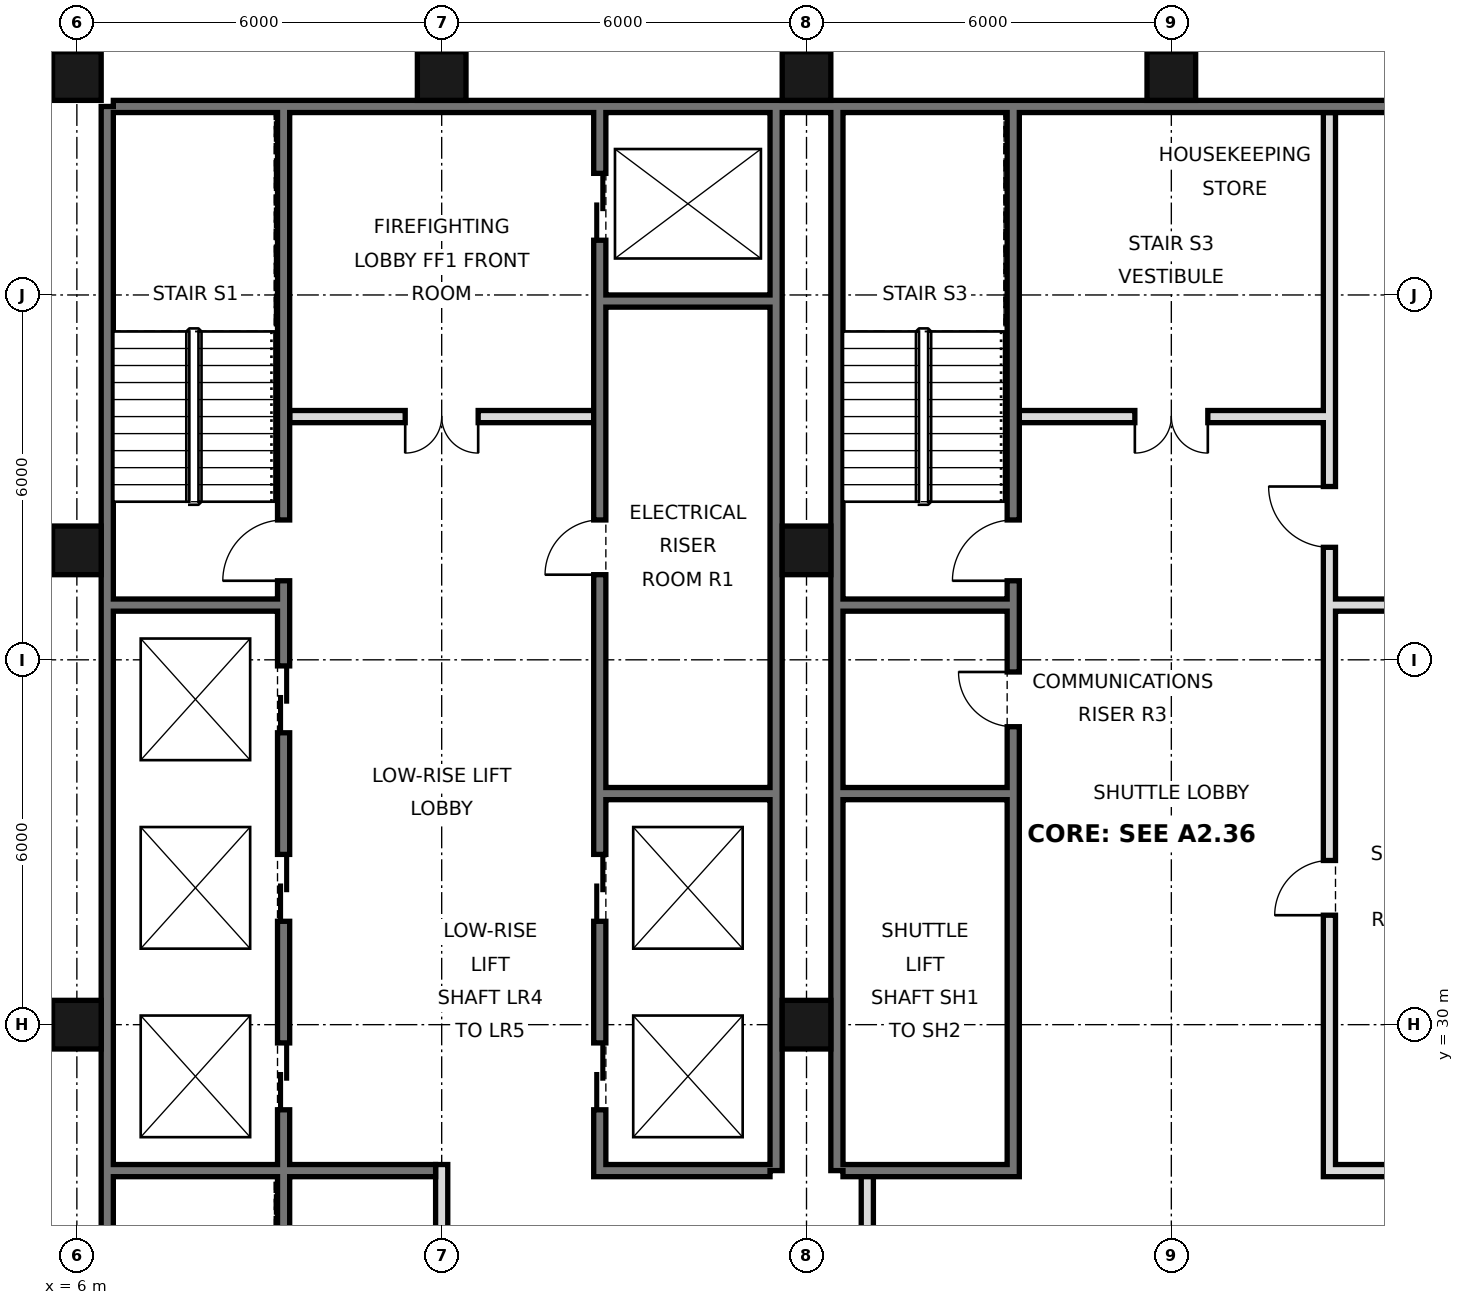
"""IFC4 building model, lengths in metres.
Left out: names, types, materials, properties, quantities, classifications, styles, units other than length and angle.
Written with IfcOpenShell. Run it as: python <this file> out.ifc"""

import sys

from ifc_helpers import new_model, si_unit, direction, frame, frame_2d, origin, origin_2d, place, context, subcontext, project, spatial, rectangle, hollow_rectangle, extrude, element, fill, save


model = new_model("IFC4")
c1 = context("Model", 3, precision=1e-05, world=origin(), true_north=direction((0.0, 1.0)))
c2 = subcontext(c1, "Body", "Model", "MODEL_VIEW")
j1 = project(units=[si_unit("LENGTHUNIT", "METRE"), si_unit("PLANEANGLEUNIT", "RADIAN")], contexts=[c1])
p1 = place(None, origin())
s1 = spatial("IfcSite", under=j1, at=p1, CompositionType="ELEMENT")
p2 = place(p1, origin())
s2 = spatial("IfcBuilding", under=s1, at=p2, CompositionType="ELEMENT")
p3 = place(p2, frame((0.0, 0.0, 143.8)))
s3 = spatial("IfcBuildingStorey", under=s2, at=p3, CompositionType="ELEMENT", Elevation=143.8)
for number, where, z_axis, x_axis in (
    (1, (6.0, 30.0, 0.0), (0.0, 0.0, 1.0), (1.0, 0.0, 0.0)),
    (2, (6.0, 37.8, 0.0), (0.0, 0.0, 1.0), (1.0, 0.0, 0.0)),
    (3, (6.0, 45.6, 0.0), (0.0, 0.0, 1.0), (1.0, 0.0, 0.0)),
    (4, (12.0, 45.6, 0.0), (0.0, 0.0, 1.0), (1.0, 0.0, 0.0)),
    (5, (18.0, 30.0, 0.0), (0.0, 0.0, 1.0), (1.0, 0.0, 0.0)),
    (6, (18.0, 37.8, 0.0), (0.0, 0.0, 1.0), (1.0, 0.0, 0.0)),
    (7, (18.0, 45.6, 0.0), (0.0, 0.0, 1.0), (1.0, 0.0, 0.0)),
    (8, (24.0, 45.6, 0.0), (0.0, 0.0, 1.0), (1.0, 0.0, 0.0)),
):
    element("IfcColumn", number, at=place(p3, frame(where, z_axis=z_axis, x_axis=x_axis)), inside=s3, PredefinedType="COLUMN", context=c2, shape_type="SweptSolid", body=[
        extrude(hollow_rectangle(XDim=0.8, YDim=0.8, WallThickness=0.05, at=origin_2d()), origin(), (0.0, 0.0, 1.0), 3.6),
    ])
p4 = place(p3, frame((6.5, 21.6, 0.0), z_axis=(0.0, 0.0, 1.0), x_axis=(0.0, 1.0, 0.0)))
e9 = element("IfcWall", 9, at=p4, inside=s3, PredefinedType="SOLIDWALL", context=c2, shape_type="SweptSolid", body=[
    extrude(rectangle(XDim=23.5, YDim=0.2, at=frame_2d((11.75, 0.0))), origin(), (0.0, 0.0, 1.0), 3.42),
])
p5 = place(p3, frame((6.6, 45.1, 0.0), z_axis=(0.0, 0.0, 1.0), x_axis=(1.0, 0.0, 0.0)))
e10 = element("IfcWall", 10, at=p5, inside=s3, PredefinedType="SOLIDWALL", context=c2, shape_type="SweptSolid", body=[
    extrude(rectangle(XDim=34.8, YDim=0.2, at=frame_2d((17.4, 0.0))), origin(), (0.0, 0.0, 1.0), 3.42),
])
for number, where, z_axis, x_axis in (
    (11, (17.5, 27.6, 0.0), (0.0, 0.0, 1.0), (0.0, 1.0, 0.0)),
    (12, (18.5, 27.6, 0.0), (0.0, 0.0, 1.0), (0.0, 1.0, 0.0)),
):
    element("IfcWall", number, at=place(p3, frame(where, z_axis=z_axis, x_axis=x_axis)), inside=s3, PredefinedType="SOLIDWALL", context=c2, shape_type="SweptSolid", body=[
        extrude(rectangle(XDim=17.5, YDim=0.2, at=frame_2d((8.75, 0.0))), origin(), (0.0, 0.0, 1.0), 3.42),
    ])
p6 = place(p3, frame((19.0, 21.6, 0.0), z_axis=(0.0, 0.0, 1.0), x_axis=(0.0, 1.0, 0.0)))
e13 = element("IfcWall", 13, at=p6, inside=s3, PredefinedType="PARTITIONING", context=c2, shape_type="SweptSolid", body=[
    extrude(rectangle(XDim=6.0, YDim=0.2, at=frame_2d((3.0, 0.0))), origin(), (0.0, 0.0, 1.0), 3.42),
])
p7 = place(p6, frame((2.1, 0.0, 0.0)))
e14 = element("IfcOpeningElement", 14, at=p7, cuts=e13, PredefinedType="OPENING", context=c2, shape_type="SweptSolid", body=[
    extrude(rectangle(XDim=1.8, YDim=2.1, at=frame_2d((0.9, 1.05))), frame((0.0, 0.11, 0.0), z_axis=(0.0, -1.0, 0.0), x_axis=(1.0, 0.0, 0.0)), (0.0, 0.0, 1.0), 0.22),
])
p8 = place(p3, frame((12.0, 21.6, 0.0), z_axis=(0.0, 0.0, 1.0), x_axis=(0.0, 1.0, 0.0)))
e15 = element("IfcWall", 15, at=p8, inside=s3, PredefinedType="PARTITIONING", context=c2, shape_type="SweptSolid", body=[
    extrude(rectangle(XDim=6.1, YDim=0.2, at=frame_2d((3.05, 0.0))), origin(), (0.0, 0.0, 1.0), 3.42),
])
p9 = place(p3, frame((14.6, 27.5, 0.0), z_axis=(0.0, 0.0, 1.0), x_axis=(0.0, 1.0, 0.0)))
e16 = element("IfcWall", 16, at=p9, inside=s3, PredefinedType="SOLIDWALL", context=c2, shape_type="SweptSolid", body=[
    extrude(rectangle(XDim=17.5, YDim=0.2, at=frame_2d((8.75, 0.0))), origin(), (0.0, 0.0, 1.0), 3.42),
])
p10 = place(p9, frame((1.1, 0.0, 0.0)))
e17 = element("IfcOpeningElement", 17, at=p10, cuts=e16, PredefinedType="OPENING", context=c2, shape_type="SweptSolid", body=[
    extrude(rectangle(XDim=1.1, YDim=2.1, at=frame_2d((0.55, 1.05))), frame((0.0, 0.11, 0.0), z_axis=(0.0, -1.0, 0.0), x_axis=(1.0, 0.0, 0.0)), (0.0, 0.0, 1.0), 0.22),
])
p11 = place(p9, frame((4.2, 0.0, 0.0)))
e18 = element("IfcOpeningElement", 18, at=p11, cuts=e16, PredefinedType="OPENING", context=c2, shape_type="SweptSolid", body=[
    extrude(rectangle(XDim=1.1, YDim=2.1, at=frame_2d((0.55, 1.05))), frame((0.0, 0.11, 0.0), z_axis=(0.0, -1.0, 0.0), x_axis=(1.0, 0.0, 0.0)), (0.0, 0.0, 1.0), 0.22),
])
p12 = place(p9, frame((15.4, 0.0, 0.0)))
e19 = element("IfcOpeningElement", 19, at=p12, cuts=e16, PredefinedType="OPENING", context=c2, shape_type="SweptSolid", body=[
    extrude(rectangle(XDim=1.1, YDim=2.1, at=frame_2d((0.55, 1.05))), frame((0.0, 0.11, 0.0), z_axis=(0.0, -1.0, 0.0), x_axis=(1.0, 0.0, 0.0)), (0.0, 0.0, 1.0), 0.22),
])
p13 = place(p9, frame((9.9, 0.0, 0.0)))
e20 = element("IfcOpeningElement", 20, at=p13, cuts=e16, PredefinedType="OPENING", context=c2, shape_type="SweptSolid", body=[
    extrude(rectangle(XDim=0.9, YDim=2.1, at=frame_2d((0.45, 1.05))), frame((0.0, 0.11, 0.0), z_axis=(0.0, -1.0, 0.0), x_axis=(1.0, 0.0, 0.0)), (0.0, 0.0, 1.0), 0.22),
])
p14 = place(p3, frame((21.4, 27.5, 0.0), z_axis=(0.0, 0.0, 1.0), x_axis=(0.0, 1.0, 0.0)))
e21 = element("IfcWall", 21, at=p14, inside=s3, PredefinedType="SOLIDWALL", context=c2, shape_type="SweptSolid", body=[
    extrude(rectangle(XDim=17.5, YDim=0.2, at=frame_2d((8.75, 0.0))), origin(), (0.0, 0.0, 1.0), 3.42),
])
p15 = place(p14, frame((9.8, 0.0, 0.0)))
e22 = element("IfcOpeningElement", 22, at=p15, cuts=e21, PredefinedType="OPENING", context=c2, shape_type="SweptSolid", body=[
    extrude(rectangle(XDim=1.0, YDim=2.1, at=frame_2d((0.5, 1.05))), frame((0.0, 0.11, 0.0), z_axis=(0.0, -1.0, 0.0), x_axis=(1.0, 0.0, 0.0)), (0.0, 0.0, 1.0), 0.22),
])
p16 = place(p14, frame((7.4, 0.0, 0.0)))
e23 = element("IfcOpeningElement", 23, at=p16, cuts=e21, PredefinedType="OPENING", context=c2, shape_type="SweptSolid", body=[
    extrude(rectangle(XDim=0.9, YDim=2.1, at=frame_2d((0.45, 1.05))), frame((0.0, 0.11, 0.0), z_axis=(0.0, -1.0, 0.0), x_axis=(1.0, 0.0, 0.0)), (0.0, 0.0, 1.0), 0.22),
])
p17 = place(p3, frame((26.6, 27.5, 0.0), z_axis=(0.0, 0.0, 1.0), x_axis=(0.0, 1.0, 0.0)))
e24 = element("IfcWall", 24, at=p17, inside=s3, PredefinedType="SOLIDWALL", context=c2, shape_type="SweptSolid", body=[
    extrude(rectangle(XDim=17.5, YDim=0.2, at=frame_2d((8.75, 0.0))), origin(), (0.0, 0.0, 1.0), 3.42),
])
p18 = place(p17, frame((4.3, 0.0, 0.0)))
e25 = element("IfcOpeningElement", 25, at=p18, cuts=e24, PredefinedType="OPENING", context=c2, shape_type="SweptSolid", body=[
    extrude(rectangle(XDim=0.9, YDim=2.1, at=frame_2d((0.45, 1.05))), frame((0.0, 0.11, 0.0), z_axis=(0.0, -1.0, 0.0), x_axis=(1.0, 0.0, 0.0)), (0.0, 0.0, 1.0), 0.22),
])
p19 = place(p17, frame((10.35, 0.0, 0.0)))
e26 = element("IfcOpeningElement", 26, at=p19, cuts=e24, PredefinedType="OPENING", context=c2, shape_type="SweptSolid", body=[
    extrude(rectangle(XDim=1.0, YDim=2.1, at=frame_2d((0.5, 1.05))), frame((0.0, 0.11, 0.0), z_axis=(0.0, -1.0, 0.0), x_axis=(1.0, 0.0, 0.0)), (0.0, 0.0, 1.0), 0.22),
])
p20 = place(p3, frame((9.4, 21.6, 0.0), z_axis=(0.0, 0.0, 1.0), x_axis=(0.0, 1.0, 0.0)))
e27 = element("IfcWall", 27, at=p20, inside=s3, PredefinedType="SOLIDWALL", context=c2, shape_type="SweptSolid", body=[
    extrude(rectangle(XDim=23.4, YDim=0.2, at=frame_2d((11.7, 0.0))), origin(), (0.0, 0.0, 1.0), 3.42),
])
p21 = place(p20, frame((7.0, 0.0, 0.0)))
e28 = element("IfcOpeningElement", 28, at=p21, cuts=e27, PredefinedType="OPENING", context=c2, shape_type="SweptSolid", body=[
    extrude(rectangle(XDim=1.1, YDim=2.1, at=frame_2d((0.55, 1.05))), frame((0.0, 0.11, 0.0), z_axis=(0.0, -1.0, 0.0), x_axis=(1.0, 0.0, 0.0)), (0.0, 0.0, 1.0), 0.22),
])
p22 = place(p20, frame((10.1, 0.0, 0.0)))
e29 = element("IfcOpeningElement", 29, at=p22, cuts=e27, PredefinedType="OPENING", context=c2, shape_type="SweptSolid", body=[
    extrude(rectangle(XDim=1.1, YDim=2.1, at=frame_2d((0.55, 1.05))), frame((0.0, 0.11, 0.0), z_axis=(0.0, -1.0, 0.0), x_axis=(1.0, 0.0, 0.0)), (0.0, 0.0, 1.0), 0.22),
])
p23 = place(p20, frame((13.2, 0.0, 0.0)))
e30 = element("IfcOpeningElement", 30, at=p23, cuts=e27, PredefinedType="OPENING", context=c2, shape_type="SweptSolid", body=[
    extrude(rectangle(XDim=1.1, YDim=2.1, at=frame_2d((0.55, 1.05))), frame((0.0, 0.11, 0.0), z_axis=(0.0, -1.0, 0.0), x_axis=(1.0, 0.0, 0.0)), (0.0, 0.0, 1.0), 0.22),
])
p24 = place(p20, frame((15.7, 0.0, 0.0)))
e31 = element("IfcOpeningElement", 31, at=p24, cuts=e27, PredefinedType="OPENING", context=c2, shape_type="SweptSolid", body=[
    extrude(rectangle(XDim=1.0, YDim=2.1, at=frame_2d((0.5, 1.05))), frame((0.0, 0.11, 0.0), z_axis=(0.0, -1.0, 0.0), x_axis=(1.0, 0.0, 0.0)), (0.0, 0.0, 1.0), 0.22),
])
p25 = place(p20, frame((0.175, 0.0, 0.0)))
e32 = element("IfcOpeningElement", 32, at=p25, cuts=e27, PredefinedType="OPENING", context=c2, shape_type="SweptSolid", body=[
    extrude(rectangle(XDim=0.9, YDim=2.1, at=frame_2d((0.45, 1.05))), frame((0.0, 0.11, 0.0), z_axis=(0.0, -1.0, 0.0), x_axis=(1.0, 0.0, 0.0)), (0.0, 0.0, 1.0), 0.22),
])
for number, where, z_axis, x_axis in (
    (33, (14.7, 27.6, 0.0), (0.0, 0.0, 1.0), (1.0, 0.0, 0.0)),
    (34, (18.6, 27.6, 0.0), (0.0, 0.0, 1.0), (1.0, 0.0, 0.0)),
    (35, (26.7, 27.6, 0.0), (0.0, 0.0, 1.0), (1.0, 0.0, 0.0)),
):
    element("IfcWall", number, at=place(p3, frame(where, z_axis=z_axis, x_axis=x_axis)), inside=s3, PredefinedType="SOLIDWALL", context=c2, shape_type="SweptSolid", body=[
        extrude(rectangle(XDim=2.7, YDim=0.2, at=frame_2d((1.35, 0.0))), origin(), (0.0, 0.0, 1.0), 3.42),
    ])
p26 = place(p3, frame((6.6, 27.6, 0.0), z_axis=(0.0, 0.0, 1.0), x_axis=(1.0, 0.0, 0.0)))
e36 = element("IfcWall", 36, at=p26, inside=s3, PredefinedType="SOLIDWALL", context=c2, shape_type="SweptSolid", body=[
    extrude(rectangle(XDim=5.3, YDim=0.2, at=frame_2d((2.65, 0.0))), origin(), (0.0, 0.0, 1.0), 3.42),
])
for number, where, z_axis, x_axis in (
    (37, (14.7, 33.8, 0.0), (0.0, 0.0, 1.0), (1.0, 0.0, 0.0)),
    (38, (18.6, 33.8, 0.0), (0.0, 0.0, 1.0), (1.0, 0.0, 0.0)),
    (39, (18.6, 36.9, 0.0), (0.0, 0.0, 1.0), (1.0, 0.0, 0.0)),
    (40, (26.7, 36.9, 0.0), (0.0, 0.0, 1.0), (1.0, 0.0, 0.0)),
    (41, (6.6, 36.9, 0.0), (0.0, 0.0, 1.0), (1.0, 0.0, 0.0)),
):
    element("IfcWall", number, at=place(p3, frame(where, z_axis=z_axis, x_axis=x_axis)), inside=s3, PredefinedType="SOLIDWALL", context=c2, shape_type="SweptSolid", body=[
        extrude(rectangle(XDim=2.7, YDim=0.2, at=frame_2d((1.35, 0.0))), origin(), (0.0, 0.0, 1.0), 3.42),
    ])
p27 = place(p3, frame((21.5, 40.0, 0.0), z_axis=(0.0, 0.0, 1.0), x_axis=(1.0, 0.0, 0.0)))
e42 = element("IfcWall", 42, at=p27, inside=s3, PredefinedType="PARTITIONING", context=c2, shape_type="SweptSolid", body=[
    extrude(rectangle(XDim=5.0, YDim=0.2, at=frame_2d((2.5, 0.0))), origin(), (0.0, 0.0, 1.0), 3.42),
])
p28 = place(p27, frame((1.9, 0.0, 0.0)))
e43 = element("IfcOpeningElement", 43, at=p28, cuts=e42, PredefinedType="OPENING", context=c2, shape_type="SweptSolid", body=[
    extrude(rectangle(XDim=1.2, YDim=2.1, at=frame_2d((0.6, 1.05))), frame((0.0, 0.11, 0.0), z_axis=(0.0, -1.0, 0.0), x_axis=(1.0, 0.0, 0.0)), (0.0, 0.0, 1.0), 0.22),
])
p29 = place(p3, frame((9.5, 40.0, 0.0), z_axis=(0.0, 0.0, 1.0), x_axis=(1.0, 0.0, 0.0)))
e44 = element("IfcWall", 44, at=p29, inside=s3, PredefinedType="PARTITIONING", context=c2, shape_type="SweptSolid", body=[
    extrude(rectangle(XDim=5.0, YDim=0.2, at=frame_2d((2.5, 0.0))), origin(), (0.0, 0.0, 1.0), 3.42),
])
p30 = place(p29, frame((1.9, 0.0, 0.0)))
e45 = element("IfcOpeningElement", 45, at=p30, cuts=e44, PredefinedType="OPENING", context=c2, shape_type="SweptSolid", body=[
    extrude(rectangle(XDim=1.2, YDim=2.1, at=frame_2d((0.6, 1.05))), frame((0.0, 0.11, 0.0), z_axis=(0.0, -1.0, 0.0), x_axis=(1.0, 0.0, 0.0)), (0.0, 0.0, 1.0), 0.22),
])
p31 = place(p3, frame((14.7, 41.9, 0.0), z_axis=(0.0, 0.0, 1.0), x_axis=(1.0, 0.0, 0.0)))
e46 = element("IfcWall", 46, at=p31, inside=s3, PredefinedType="SOLIDWALL", context=c2, shape_type="SweptSolid", body=[
    extrude(rectangle(XDim=2.7, YDim=0.2, at=frame_2d((1.35, 0.0))), origin(), (0.0, 0.0, 1.0), 3.42),
])
p32 = place(p30, frame((1.2, 0.0, 0.0), z_axis=(0.0, 0.0, 1.0), x_axis=(-1.0, 0.0, 0.0)))
e47 = element("IfcDoor", 47, at=p32, inside=s3, OperationType="DOUBLE_DOOR_SINGLE_SWING", PredefinedType="DOOR", context=c2, shape_type="SweptSolid", body=[
    extrude(rectangle(XDim=1.2, YDim=2.1, at=frame_2d((0.6, 1.05))), frame((0.0, 0.025, 0.0), z_axis=(0.0, -1.0, 0.0), x_axis=(1.0, 0.0, 0.0)), (0.0, 0.0, 1.0), 0.05),
])
fill(e45, e47)
p33 = place(p28, frame((1.2, 0.0, 0.0), z_axis=(0.0, 0.0, 1.0), x_axis=(-1.0, 0.0, 0.0)))
e48 = element("IfcDoor", 48, at=p33, inside=s3, OperationType="DOUBLE_DOOR_SINGLE_SWING", PredefinedType="DOOR", context=c2, shape_type="SweptSolid", body=[
    extrude(rectangle(XDim=1.2, YDim=2.1, at=frame_2d((0.6, 1.05))), frame((0.0, 0.025, 0.0), z_axis=(0.0, -1.0, 0.0), x_axis=(1.0, 0.0, 0.0)), (0.0, 0.0, 1.0), 0.05),
])
fill(e43, e48)
p34 = place(p10, origin())
e49 = element("IfcDoor", 49, at=p34, inside=s3, OperationType="DOUBLE_DOOR_SLIDING", PredefinedType="DOOR", context=c2, shape_type="SweptSolid", body=[
    extrude(rectangle(XDim=1.1, YDim=2.1, at=frame_2d((0.55, 1.05))), frame((0.0, 0.025, 0.0), z_axis=(0.0, -1.0, 0.0), x_axis=(1.0, 0.0, 0.0)), (0.0, 0.0, 1.0), 0.05),
])
fill(e17, e49)
p35 = place(p11, origin())
e50 = element("IfcDoor", 50, at=p35, inside=s3, OperationType="DOUBLE_DOOR_SLIDING", PredefinedType="DOOR", context=c2, shape_type="SweptSolid", body=[
    extrude(rectangle(XDim=1.1, YDim=2.1, at=frame_2d((0.55, 1.05))), frame((0.0, 0.025, 0.0), z_axis=(0.0, -1.0, 0.0), x_axis=(1.0, 0.0, 0.0)), (0.0, 0.0, 1.0), 0.05),
])
fill(e18, e50)
p36 = place(p12, origin())
e51 = element("IfcDoor", 51, at=p36, inside=s3, OperationType="DOUBLE_DOOR_SLIDING", PredefinedType="DOOR", context=c2, shape_type="SweptSolid", body=[
    extrude(rectangle(XDim=1.1, YDim=2.1, at=frame_2d((0.55, 1.05))), frame((0.0, 0.025, 0.0), z_axis=(0.0, -1.0, 0.0), x_axis=(1.0, 0.0, 0.0)), (0.0, 0.0, 1.0), 0.05),
])
fill(e19, e51)
p37 = place(p21, origin())
e52 = element("IfcDoor", 52, at=p37, inside=s3, OperationType="DOUBLE_DOOR_SLIDING", PredefinedType="DOOR", context=c2, shape_type="SweptSolid", body=[
    extrude(rectangle(XDim=1.1, YDim=2.1, at=frame_2d((0.55, 1.05))), frame((0.0, 0.025, 0.0), z_axis=(0.0, -1.0, 0.0), x_axis=(1.0, 0.0, 0.0)), (0.0, 0.0, 1.0), 0.05),
])
fill(e28, e52)
p38 = place(p22, origin())
e53 = element("IfcDoor", 53, at=p38, inside=s3, OperationType="DOUBLE_DOOR_SLIDING", PredefinedType="DOOR", context=c2, shape_type="SweptSolid", body=[
    extrude(rectangle(XDim=1.1, YDim=2.1, at=frame_2d((0.55, 1.05))), frame((0.0, 0.025, 0.0), z_axis=(0.0, -1.0, 0.0), x_axis=(1.0, 0.0, 0.0)), (0.0, 0.0, 1.0), 0.05),
])
fill(e29, e53)
p39 = place(p23, origin())
e54 = element("IfcDoor", 54, at=p39, inside=s3, OperationType="DOUBLE_DOOR_SLIDING", PredefinedType="DOOR", context=c2, shape_type="SweptSolid", body=[
    extrude(rectangle(XDim=1.1, YDim=2.1, at=frame_2d((0.55, 1.05))), frame((0.0, 0.025, 0.0), z_axis=(0.0, -1.0, 0.0), x_axis=(1.0, 0.0, 0.0)), (0.0, 0.0, 1.0), 0.05),
])
fill(e30, e54)
p40 = place(p24, origin())
e55 = element("IfcDoor", 55, at=p40, inside=s3, OperationType="SINGLE_SWING_LEFT", PredefinedType="DOOR", context=c2, shape_type="SweptSolid", body=[
    extrude(rectangle(XDim=1.0, YDim=2.1, at=frame_2d((0.5, 1.05))), frame((0.0, 0.025, 0.0), z_axis=(0.0, -1.0, 0.0), x_axis=(1.0, 0.0, 0.0)), (0.0, 0.0, 1.0), 0.05),
])
fill(e31, e55)
p41 = place(p15, origin())
e56 = element("IfcDoor", 56, at=p41, inside=s3, OperationType="SINGLE_SWING_LEFT", PredefinedType="DOOR", context=c2, shape_type="SweptSolid", body=[
    extrude(rectangle(XDim=1.0, YDim=2.1, at=frame_2d((0.5, 1.05))), frame((0.0, 0.025, 0.0), z_axis=(0.0, -1.0, 0.0), x_axis=(1.0, 0.0, 0.0)), (0.0, 0.0, 1.0), 0.05),
])
fill(e22, e56)
p42 = place(p13, origin())
e57 = element("IfcDoor", 57, at=p42, inside=s3, OperationType="SINGLE_SWING_LEFT", PredefinedType="DOOR", context=c2, shape_type="SweptSolid", body=[
    extrude(rectangle(XDim=0.9, YDim=2.1, at=frame_2d((0.45, 1.05))), frame((0.0, 0.025, 0.0), z_axis=(0.0, -1.0, 0.0), x_axis=(1.0, 0.0, 0.0)), (0.0, 0.0, 1.0), 0.05),
])
fill(e20, e57)
p43 = place(p16, frame((0.9, 0.0, 0.0), z_axis=(0.0, 0.0, 1.0), x_axis=(-1.0, 0.0, 0.0)))
e58 = element("IfcDoor", 58, at=p43, inside=s3, OperationType="SINGLE_SWING_LEFT", PredefinedType="DOOR", context=c2, shape_type="SweptSolid", body=[
    extrude(rectangle(XDim=0.9, YDim=2.1, at=frame_2d((0.45, 1.05))), frame((0.0, 0.025, 0.0), z_axis=(0.0, -1.0, 0.0), x_axis=(1.0, 0.0, 0.0)), (0.0, 0.0, 1.0), 0.05),
])
fill(e23, e58)
p44 = place(p18, origin())
e59 = element("IfcDoor", 59, at=p44, inside=s3, OperationType="SINGLE_SWING_LEFT", PredefinedType="DOOR", context=c2, shape_type="SweptSolid", body=[
    extrude(rectangle(XDim=0.9, YDim=2.1, at=frame_2d((0.45, 1.05))), frame((0.0, 0.025, 0.0), z_axis=(0.0, -1.0, 0.0), x_axis=(1.0, 0.0, 0.0)), (0.0, 0.0, 1.0), 0.05),
])
fill(e25, e59)
p45 = place(p19, frame((1.0, 0.0, 0.0), z_axis=(0.0, 0.0, 1.0), x_axis=(-1.0, 0.0, 0.0)))
e60 = element("IfcDoor", 60, at=p45, inside=s3, OperationType="SINGLE_SWING_LEFT", PredefinedType="DOOR", context=c2, shape_type="SweptSolid", body=[
    extrude(rectangle(XDim=1.0, YDim=2.1, at=frame_2d((0.5, 1.05))), frame((0.0, 0.025, 0.0), z_axis=(0.0, -1.0, 0.0), x_axis=(1.0, 0.0, 0.0)), (0.0, 0.0, 1.0), 0.05),
])
fill(e26, e60)
save(model, sys.argv[1])
